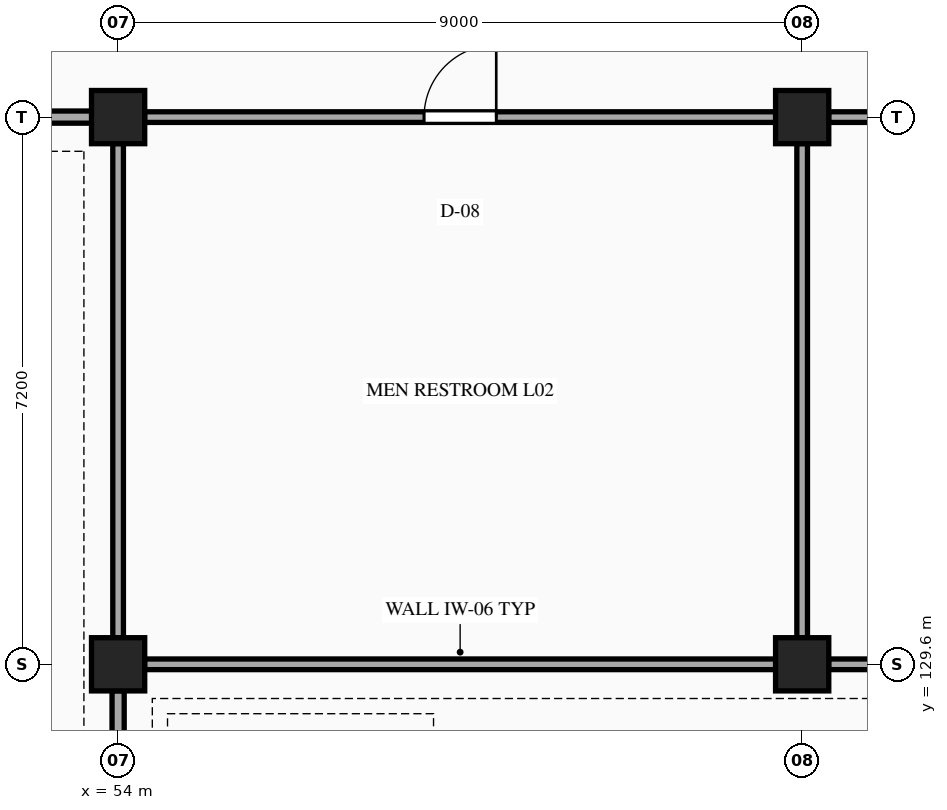
"""IFC4 building model, lengths in metres.
Left out: names, types, materials, properties, quantities, classifications, styles, units other than length and angle.
Written with IfcOpenShell. Run it as: python <this file> out.ifc"""

import sys

from ifc_helpers import new_model, si_unit, direction, frame, frame_2d, origin, origin_2d, place, context, subcontext, project, spatial, rectangle, extrude, element, fill, save


model = new_model("IFC4")
c1 = context("Model", 3, precision=1e-05, world=origin(), true_north=direction((0.0, 1.0)))
c2 = subcontext(c1, "Body", "Model", "MODEL_VIEW")
j1 = project(units=[si_unit("LENGTHUNIT", "METRE"), si_unit("PLANEANGLEUNIT", "RADIAN")], contexts=[c1])
p1 = place(None, origin())
s1 = spatial("IfcSite", under=j1, at=p1, CompositionType="ELEMENT")
p2 = place(p1, origin())
s2 = spatial("IfcBuilding", under=s1, at=p2, CompositionType="ELEMENT")
p3 = place(p2, frame((0.0, 0.0, 10.8)))
s3 = spatial("IfcBuildingStorey", under=s2, at=p3, CompositionType="ELEMENT", Elevation=10.8)
for number, where, z_axis, x_axis in (
    (1, (54.0, 129.6, 0.0), (0.0, 0.0, 1.0), (1.0, 0.0, 0.0)),
    (2, (54.0, 136.8, 0.0), (0.0, 0.0, 1.0), (1.0, 0.0, 0.0)),
    (3, (63.0, 129.6, 0.0), (0.0, 0.0, 1.0), (1.0, 0.0, 0.0)),
    (4, (63.0, 136.8, 0.0), (0.0, 0.0, 1.0), (1.0, 0.0, 0.0)),
):
    element("IfcColumn", number, at=place(p3, frame(where, z_axis=z_axis, x_axis=x_axis)), inside=s3, PredefinedType="COLUMN", context=c2, shape_type="SweptSolid", body=[
        extrude(rectangle(XDim=0.7, YDim=0.7, at=origin_2d()), origin(), (0.0, 0.0, 1.0), 4.5),
    ])
for number, where, z_axis, x_axis in (
    (5, (54.348, 129.6, 0.0), (0.0, 0.0, 1.0), (1.0, 0.0, 0.0)),
    (6, (63.348, 129.6, 0.0), (0.0, 0.0, 1.0), (1.0, 0.0, 0.0)),
):
    element("IfcWall", number, at=place(p3, frame(where, z_axis=z_axis, x_axis=x_axis)), inside=s3, PredefinedType="PARTITIONING", context=c2, shape_type="SweptSolid", body=[
        extrude(rectangle(XDim=8.304, YDim=0.14, at=frame_2d((4.152, 0.0))), origin(), (0.0, 0.0, 1.0), 3.628),
    ])
p4 = place(p3, frame((46.0, 136.8, 0.0), z_axis=(0.0, 0.0, 1.0), x_axis=(1.0, 0.0, 0.0)))
e7 = element("IfcWall", 7, at=p4, inside=s3, PredefinedType="PARTITIONING", context=c2, shape_type="SweptSolid", body=[
    extrude(rectangle(XDim=7.652, YDim=0.16, at=frame_2d((3.826, 0.0))), origin(), (0.0, 0.0, 1.0), 3.628),
])
p5 = place(p4, frame((2.926, 0.0, 0.0)))
e8 = element("IfcOpeningElement", 8, at=p5, cuts=e7, PredefinedType="OPENING", context=c2, shape_type="SweptSolid", body=[
    extrude(rectangle(XDim=1.8, YDim=2.25, at=frame_2d((0.9, 1.125))), frame((0.0, 0.09, 0.0), z_axis=(0.0, -1.0, 0.0), x_axis=(1.0, 0.0, 0.0)), (0.0, 0.0, 1.0), 0.18),
])
p6 = place(p3, frame((54.348, 136.8, 0.0), z_axis=(0.0, 0.0, 1.0), x_axis=(1.0, 0.0, 0.0)))
e9 = element("IfcWall", 9, at=p6, inside=s3, PredefinedType="PARTITIONING", context=c2, shape_type="SweptSolid", body=[
    extrude(rectangle(XDim=8.304, YDim=0.14, at=frame_2d((4.152, 0.0))), origin(), (0.0, 0.0, 1.0), 3.628),
])
p7 = place(p6, frame((3.677, 0.0, 0.0)))
e10 = element("IfcOpeningElement", 10, at=p7, cuts=e9, PredefinedType="OPENING", context=c2, shape_type="SweptSolid", body=[
    extrude(rectangle(XDim=0.95, YDim=2.1, at=frame_2d((0.475, 1.05))), frame((0.0, 0.08, 0.0), z_axis=(0.0, -1.0, 0.0), x_axis=(1.0, 0.0, 0.0)), (0.0, 0.0, 1.0), 0.16),
])
p8 = place(p3, frame((63.348, 136.8, 0.0), z_axis=(0.0, 0.0, 1.0), x_axis=(1.0, 0.0, 0.0)))
e11 = element("IfcWall", 11, at=p8, inside=s3, PredefinedType="PARTITIONING", context=c2, shape_type="SweptSolid", body=[
    extrude(rectangle(XDim=8.304, YDim=0.14, at=frame_2d((4.152, 0.0))), origin(), (0.0, 0.0, 1.0), 3.628),
])
p9 = place(p8, frame((3.677, 0.0, 0.0)))
e12 = element("IfcOpeningElement", 12, at=p9, cuts=e11, PredefinedType="OPENING", context=c2, shape_type="SweptSolid", body=[
    extrude(rectangle(XDim=0.95, YDim=2.1, at=frame_2d((0.475, 1.05))), frame((0.0, 0.08, 0.0), z_axis=(0.0, -1.0, 0.0), x_axis=(1.0, 0.0, 0.0)), (0.0, 0.0, 1.0), 0.16),
])
p10 = place(p3, frame((54.0, 123.6, 0.0), z_axis=(0.0, 0.0, 1.0), x_axis=(0.0, 1.0, 0.0)))
e13 = element("IfcWall", 13, at=p10, inside=s3, PredefinedType="PARTITIONING", context=c2, shape_type="SweptSolid", body=[
    extrude(rectangle(XDim=5.652, YDim=0.16, at=frame_2d((2.826, 0.0))), origin(), (0.0, 0.0, 1.0), 3.628),
])
for number, where, z_axis, x_axis in (
    (14, (54.0, 129.948, 0.0), (0.0, 0.0, 1.0), (0.0, 1.0, 0.0)),
    (15, (63.0, 129.948, 0.0), (0.0, 0.0, 1.0), (0.0, 1.0, 0.0)),
):
    element("IfcWall", number, at=place(p3, frame(where, z_axis=z_axis, x_axis=x_axis)), inside=s3, PredefinedType="PARTITIONING", context=c2, shape_type="SweptSolid", body=[
        extrude(rectangle(XDim=6.504, YDim=0.14, at=frame_2d((3.252, 0.0))), origin(), (0.0, 0.0, 1.0), 3.628),
    ])
p11 = place(p7, origin())
e16 = element("IfcDoor", 16, at=p11, inside=s3, OperationType="SINGLE_SWING_RIGHT", PredefinedType="DOOR", context=c2, shape_type="SweptSolid", body=[
    extrude(rectangle(XDim=0.95, YDim=2.1, at=frame_2d((0.475, 1.05))), frame((0.0, 0.025, 0.0), z_axis=(0.0, -1.0, 0.0), x_axis=(1.0, 0.0, 0.0)), (0.0, 0.0, 1.0), 0.05),
])
fill(e10, e16)
save(model, sys.argv[1])
